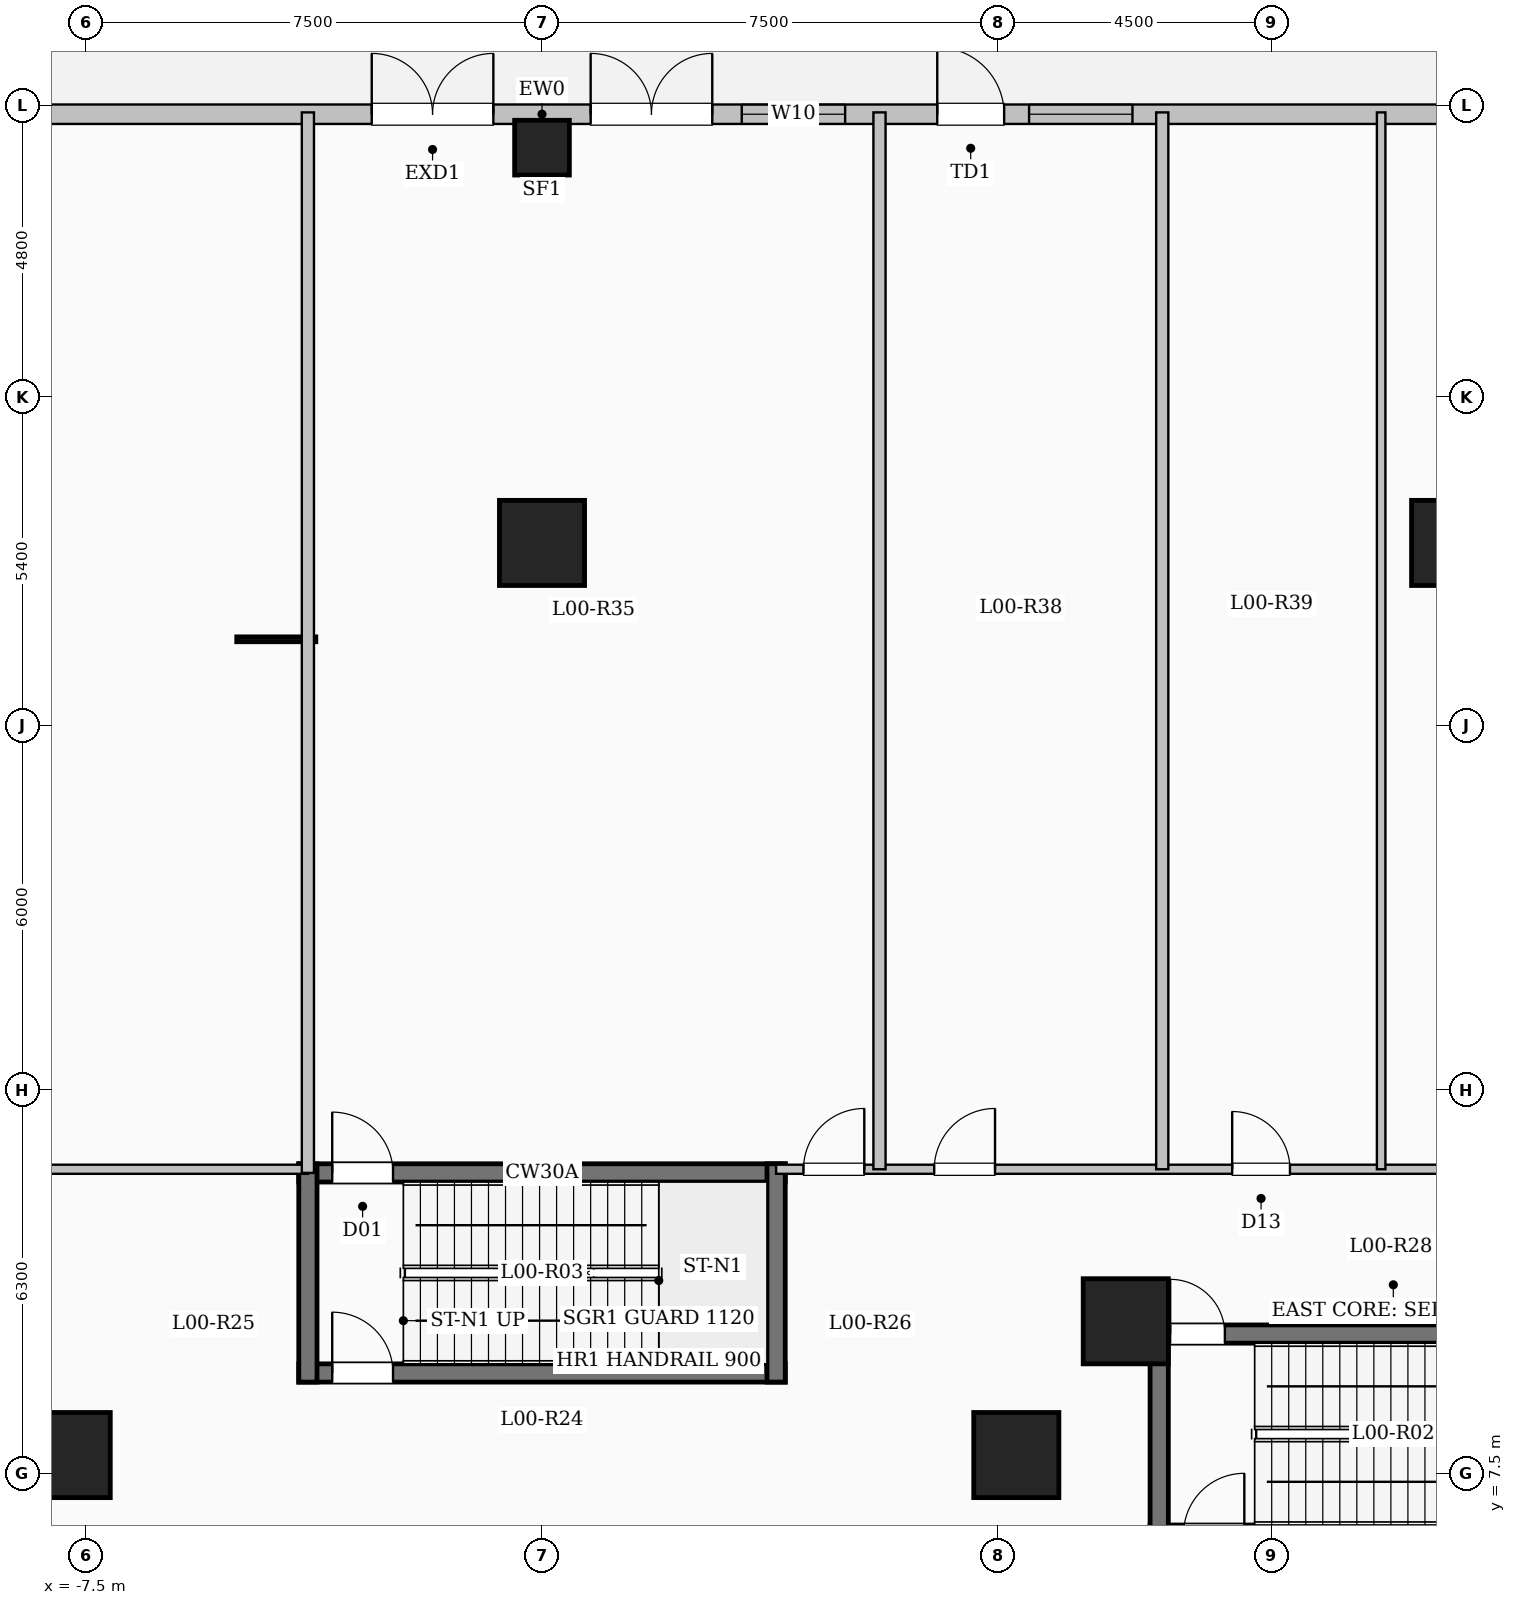
"""IFC4 building model, lengths in metres.
Left out: names, types, materials, properties, quantities, classifications, styles, units other than length and angle.
Written with IfcOpenShell. Run it as: python <this file> out.ifc"""

import sys

from ifc_helpers import new_model, si_unit, direction, frame, frame_2d, origin, origin_2d, place, context, subcontext, project, spatial, rectangle, extrude, element, fill, save


model = new_model("IFC4")
c1 = context("Model", 3, precision=1e-05, world=origin(), true_north=direction((0.0, 1.0)))
c2 = subcontext(c1, "Body", "Model", "MODEL_VIEW")
j1 = project(units=[si_unit("LENGTHUNIT", "METRE"), si_unit("PLANEANGLEUNIT", "RADIAN")], contexts=[c1])
p1 = place(None, origin())
s1 = spatial("IfcSite", under=j1, at=p1, CompositionType="ELEMENT")
p2 = place(p1, origin())
s2 = spatial("IfcBuilding", under=s1, at=p2, CompositionType="ELEMENT")
p3 = place(p2, origin())
s3 = spatial("IfcBuildingStorey", under=s2, at=p3, CompositionType="ELEMENT", Elevation=0.0)
for number, where, z_axis, x_axis in (
    (1, (-7.8, 7.8, 0.0), (0.0, 0.0, 1.0), (1.0, 0.0, 0.0)),
    (2, (7.8, 7.8, 0.0), (0.0, 0.0, 1.0), (1.0, 0.0, 0.0)),
    (3, (9.6, 10.0, 0.0), (0.0, 0.0, 1.0), (1.0, 0.0, 0.0)),
):
    element("IfcColumn", number, at=place(p3, frame(where, z_axis=z_axis, x_axis=x_axis)), inside=s3, PredefinedType="COLUMN", context=c2, shape_type="SweptSolid", body=[
        extrude(rectangle(XDim=1.4, YDim=1.4, at=origin_2d()), origin(), (0.0, 0.0, 1.0), 5.4),
    ])
p4 = place(p3, frame((0.0, 29.3, 0.0), z_axis=(0.0, 0.0, 1.0), x_axis=(1.0, 0.0, 0.0)))
e4 = element("IfcColumn", 4, at=p4, inside=s3, PredefinedType="COLUMN", context=c2, shape_type="SweptSolid", body=[
    extrude(rectangle(XDim=0.9, YDim=0.9, at=origin_2d()), origin(), (0.0, 0.0, 1.0), 5.4),
])
for number, where, z_axis, x_axis in (
    (5, (0.0, 22.8, 0.0), (0.0, 0.0, 1.0), (1.0, 0.0, 0.0)),
    (6, (15.0, 22.8, 0.0), (0.0, 0.0, 1.0), (1.0, 0.0, 0.0)),
):
    element("IfcColumn", number, at=place(p3, frame(where, z_axis=z_axis, x_axis=x_axis)), inside=s3, PredefinedType="COLUMN", context=c2, shape_type="SweptSolid", body=[
        extrude(rectangle(XDim=1.4, YDim=1.4, at=origin_2d()), origin(), (0.0, 0.0, 1.0), 5.4),
    ])
p5 = place(p3, frame((-32.85, 29.85, 0.0), z_axis=(0.0, 0.0, 1.0), x_axis=(1.0, 0.0, 0.0)))
e7 = element("IfcWall", 7, at=p5, inside=s3, PredefinedType="SOLIDWALL", context=c2, shape_type="SweptSolid", body=[
    extrude(rectangle(XDim=65.7, YDim=0.32, at=frame_2d((32.85, 0.0))), origin(), (0.0, 0.0, 1.0), 5.1),
])
p6 = place(p5, frame((30.05, 0.0, 0.0)))
e8 = element("IfcOpeningElement", 8, at=p6, cuts=e7, PredefinedType="OPENING", context=c2, shape_type="SweptSolid", body=[
    extrude(rectangle(XDim=2.0, YDim=2.4, at=frame_2d((1.0, 1.2))), frame((0.0, 0.17, 0.0), z_axis=(0.0, -1.0, 0.0), x_axis=(1.0, 0.0, 0.0)), (0.0, 0.0, 1.0), 0.34),
])
p7 = place(p5, frame((33.65, 0.0, 0.0)))
e9 = element("IfcOpeningElement", 9, at=p7, cuts=e7, PredefinedType="OPENING", context=c2, shape_type="SweptSolid", body=[
    extrude(rectangle(XDim=2.0, YDim=2.4, at=frame_2d((1.0, 1.2))), frame((0.0, 0.17, 0.0), z_axis=(0.0, -1.0, 0.0), x_axis=(1.0, 0.0, 0.0)), (0.0, 0.0, 1.0), 0.34),
])
p8 = place(p5, frame((39.35, 0.0, 0.0)))
e10 = element("IfcOpeningElement", 10, at=p8, cuts=e7, PredefinedType="OPENING", context=c2, shape_type="SweptSolid", body=[
    extrude(rectangle(XDim=1.1, YDim=2.2, at=frame_2d((0.55, 1.1))), frame((0.0, 0.17, 0.0), z_axis=(0.0, -1.0, 0.0), x_axis=(1.0, 0.0, 0.0)), (0.0, 0.0, 1.0), 0.34),
])
p9 = place(p5, frame((58.05, 0.0, 0.0)))
e11 = element("IfcOpeningElement", 11, at=p9, cuts=e7, PredefinedType="OPENING", context=c2, shape_type="SweptSolid", body=[
    extrude(rectangle(XDim=2.4, YDim=2.6, at=frame_2d((1.2, 1.3))), frame((0.0, 0.17, 0.0), z_axis=(0.0, -1.0, 0.0), x_axis=(1.0, 0.0, 0.0)), (0.0, 0.0, 1.0), 0.34),
])
p10 = place(p5, frame((7.325, 0.0, 0.9)))
e12 = element("IfcOpeningElement", 12, at=p10, cuts=e7, PredefinedType="OPENING", context=c2, shape_type="SweptSolid", body=[
    extrude(rectangle(XDim=2.1, YDim=2.0, at=frame_2d((1.05, 1.0))), frame((0.0, 0.17, 0.0), z_axis=(0.0, -1.0, 0.0), x_axis=(1.0, 0.0, 0.0)), (0.0, 0.0, 1.0), 0.34),
])
p11 = place(p5, frame((21.875, 0.0, 0.9)))
e13 = element("IfcOpeningElement", 13, at=p11, cuts=e7, PredefinedType="OPENING", context=c2, shape_type="SweptSolid", body=[
    extrude(rectangle(XDim=2.1, YDim=2.0, at=frame_2d((1.05, 1.0))), frame((0.0, 0.17, 0.0), z_axis=(0.0, -1.0, 0.0), x_axis=(1.0, 0.0, 0.0)), (0.0, 0.0, 1.0), 0.34),
])
p12 = place(p5, frame((36.135, 0.0, 0.9)))
e14 = element("IfcOpeningElement", 14, at=p12, cuts=e7, PredefinedType="OPENING", context=c2, shape_type="SweptSolid", body=[
    extrude(rectangle(XDim=1.7, YDim=1.9, at=frame_2d((0.85, 0.95))), frame((0.0, 0.17, 0.0), z_axis=(0.0, -1.0, 0.0), x_axis=(1.0, 0.0, 0.0)), (0.0, 0.0, 1.0), 0.34),
])
p13 = place(p5, frame((40.86, 0.0, 0.9)))
e15 = element("IfcOpeningElement", 15, at=p13, cuts=e7, PredefinedType="OPENING", context=c2, shape_type="SweptSolid", body=[
    extrude(rectangle(XDim=1.7, YDim=1.9, at=frame_2d((0.85, 0.95))), frame((0.0, 0.17, 0.0), z_axis=(0.0, -1.0, 0.0), x_axis=(1.0, 0.0, 0.0)), (0.0, 0.0, 1.0), 0.34),
])
p14 = place(p5, frame((52.1, 0.0, 0.9)))
e16 = element("IfcOpeningElement", 16, at=p14, cuts=e7, PredefinedType="OPENING", context=c2, shape_type="SweptSolid", body=[
    extrude(rectangle(XDim=2.1, YDim=2.0, at=frame_2d((1.05, 1.0))), frame((0.0, 0.17, 0.0), z_axis=(0.0, -1.0, 0.0), x_axis=(1.0, 0.0, 0.0)), (0.0, 0.0, 1.0), 0.34),
])
p15 = place(p5, frame((62.035, 0.0, 0.9)))
e17 = element("IfcOpeningElement", 17, at=p15, cuts=e7, PredefinedType="OPENING", context=c2, shape_type="SweptSolid", body=[
    extrude(rectangle(XDim=2.1, YDim=2.0, at=frame_2d((1.05, 1.0))), frame((0.0, 0.17, 0.0), z_axis=(0.0, -1.0, 0.0), x_axis=(1.0, 0.0, 0.0)), (0.0, 0.0, 1.0), 0.34),
])
p16 = place(p3, frame((10.0, 9.79, 0.0), z_axis=(0.0, 0.0, 1.0), x_axis=(1.0, 0.0, 0.0)))
e18 = element("IfcWall", 18, at=p16, inside=s3, PredefinedType="SHEAR", context=c2, shape_type="SweptSolid", body=[
    extrude(rectangle(XDim=8.0, YDim=0.3, at=frame_2d((4.0, 0.0))), origin(), (0.0, 0.0, 1.0), 5.4),
])
p17 = place(p16, frame((0.33, 0.0, 0.0)))
e19 = element("IfcOpeningElement", 19, at=p17, cuts=e18, PredefinedType="OPENING", context=c2, shape_type="SweptSolid", body=[
    extrude(rectangle(XDim=0.9, YDim=2.15, at=frame_2d((0.45, 1.075))), frame((0.0, 0.16, 0.0), z_axis=(0.0, -1.0, 0.0), x_axis=(1.0, 0.0, 0.0)), (0.0, 0.0, 1.0), 0.32),
])
p18 = place(p3, frame((10.0, 6.5, 0.0), z_axis=(0.0, 0.0, 1.0), x_axis=(1.0, 0.0, 0.0)))
e20 = element("IfcWall", 20, at=p18, inside=s3, PredefinedType="SHEAR", context=c2, shape_type="SweptSolid", body=[
    extrude(rectangle(XDim=8.0, YDim=0.3, at=frame_2d((4.0, 0.0))), origin(), (0.0, 0.0, 1.0), 5.4),
])
p19 = place(p18, frame((0.55, 0.0, 0.0)))
e21 = element("IfcOpeningElement", 21, at=p19, cuts=e20, PredefinedType="OPENING", context=c2, shape_type="SweptSolid", body=[
    extrude(rectangle(XDim=1.0, YDim=2.15, at=frame_2d((0.5, 1.075))), frame((0.0, 0.16, 0.0), z_axis=(0.0, -1.0, 0.0), x_axis=(1.0, 0.0, 0.0)), (0.0, 0.0, 1.0), 0.32),
])
p20 = place(p3, frame((10.15, 6.35, 0.0), z_axis=(0.0, 0.0, 1.0), x_axis=(0.0, 1.0, 0.0)))
e22 = element("IfcWall", 22, at=p20, inside=s3, PredefinedType="SHEAR", context=c2, shape_type="SweptSolid", body=[
    extrude(rectangle(XDim=3.59, YDim=0.3, at=frame_2d((1.795, 0.0))), origin(), (0.0, 0.0, 1.0), 5.4),
])
p21 = place(p3, frame((-4.0, 12.44, 0.0), z_axis=(0.0, 0.0, 1.0), x_axis=(1.0, 0.0, 0.0)))
e23 = element("IfcWall", 23, at=p21, inside=s3, PredefinedType="SHEAR", context=c2, shape_type="SweptSolid", body=[
    extrude(rectangle(XDim=8.0, YDim=0.3, at=frame_2d((4.0, 0.0))), origin(), (0.0, 0.0, 1.0), 5.4),
])
p22 = place(p21, frame((0.55, 0.0, 0.0)))
e24 = element("IfcOpeningElement", 24, at=p22, cuts=e23, PredefinedType="OPENING", context=c2, shape_type="SweptSolid", body=[
    extrude(rectangle(XDim=1.0, YDim=2.15, at=frame_2d((0.5, 1.075))), frame((0.0, 0.16, 0.0), z_axis=(0.0, -1.0, 0.0), x_axis=(1.0, 0.0, 0.0)), (0.0, 0.0, 1.0), 0.32),
])
p23 = place(p3, frame((-4.0, 9.15, 0.0), z_axis=(0.0, 0.0, 1.0), x_axis=(1.0, 0.0, 0.0)))
e25 = element("IfcWall", 25, at=p23, inside=s3, PredefinedType="SHEAR", context=c2, shape_type="SweptSolid", body=[
    extrude(rectangle(XDim=8.0, YDim=0.3, at=frame_2d((4.0, 0.0))), origin(), (0.0, 0.0, 1.0), 5.4),
])
p24 = place(p23, frame((0.55, 0.0, 0.0)))
e26 = element("IfcOpeningElement", 26, at=p24, cuts=e25, PredefinedType="OPENING", context=c2, shape_type="SweptSolid", body=[
    extrude(rectangle(XDim=1.0, YDim=2.15, at=frame_2d((0.5, 1.075))), frame((0.0, 0.16, 0.0), z_axis=(0.0, -1.0, 0.0), x_axis=(1.0, 0.0, 0.0)), (0.0, 0.0, 1.0), 0.32),
])
for number, where, z_axis, x_axis in (
    (27, (-3.85, 9.0, 0.0), (0.0, 0.0, 1.0), (0.0, 1.0, 0.0)),
    (28, (3.85, 9.0, 0.0), (0.0, 0.0, 1.0), (0.0, 1.0, 0.0)),
):
    element("IfcWall", number, at=place(p3, frame(where, z_axis=z_axis, x_axis=x_axis)), inside=s3, PredefinedType="SHEAR", context=c2, shape_type="SweptSolid", body=[
        extrude(rectangle(XDim=3.59, YDim=0.3, at=frame_2d((1.795, 0.0))), origin(), (0.0, 0.0, 1.0), 5.4),
    ])
p25 = place(p3, frame((-32.88, 12.5, 0.0), z_axis=(0.0, 0.0, 1.0), x_axis=(1.0, 0.0, 0.0)))
e29 = element("IfcWall", 29, at=p25, inside=s3, PredefinedType="PARTITIONING", context=c2, shape_type="SweptSolid", body=[
    extrude(rectangle(XDim=29.03, YDim=0.15, at=frame_2d((14.515, 0.0))), origin(), (0.0, 0.0, 1.0), 5.1),
])
p26 = place(p25, frame((2.9, 0.0, 0.0)))
e30 = element("IfcOpeningElement", 30, at=p26, cuts=e29, PredefinedType="OPENING", context=c2, shape_type="SweptSolid", body=[
    extrude(rectangle(XDim=1.4, YDim=2.2, at=frame_2d((0.7, 1.1))), frame((0.0, 0.085, 0.0), z_axis=(0.0, -1.0, 0.0), x_axis=(1.0, 0.0, 0.0)), (0.0, 0.0, 1.0), 0.17),
])
p27 = place(p25, frame((20.88, 0.0, 0.0)))
e31 = element("IfcOpeningElement", 31, at=p27, cuts=e29, PredefinedType="OPENING", context=c2, shape_type="SweptSolid", body=[
    extrude(rectangle(XDim=1.2, YDim=2.15, at=frame_2d((0.6, 1.075))), frame((0.0, 0.085, 0.0), z_axis=(0.0, -1.0, 0.0), x_axis=(1.0, 0.0, 0.0)), (0.0, 0.0, 1.0), 0.17),
])
p28 = place(p3, frame((3.85, 12.5, 0.0), z_axis=(0.0, 0.0, 1.0), x_axis=(1.0, 0.0, 0.0)))
e32 = element("IfcWall", 32, at=p28, inside=s3, PredefinedType="PARTITIONING", context=c2, shape_type="SweptSolid", body=[
    extrude(rectangle(XDim=29.03, YDim=0.15, at=frame_2d((14.515, 0.0))), origin(), (0.0, 0.0, 1.0), 5.1),
])
p29 = place(p28, frame((0.45, 0.0, 0.0)))
e33 = element("IfcOpeningElement", 33, at=p29, cuts=e32, PredefinedType="OPENING", context=c2, shape_type="SweptSolid", body=[
    extrude(rectangle(XDim=1.0, YDim=2.15, at=frame_2d((0.5, 1.075))), frame((0.0, 0.085, 0.0), z_axis=(0.0, -1.0, 0.0), x_axis=(1.0, 0.0, 0.0)), (0.0, 0.0, 1.0), 0.17),
])
p30 = place(p28, frame((2.6, 0.0, 0.0)))
e34 = element("IfcOpeningElement", 34, at=p30, cuts=e32, PredefinedType="OPENING", context=c2, shape_type="SweptSolid", body=[
    extrude(rectangle(XDim=1.0, YDim=2.15, at=frame_2d((0.5, 1.075))), frame((0.0, 0.085, 0.0), z_axis=(0.0, -1.0, 0.0), x_axis=(1.0, 0.0, 0.0)), (0.0, 0.0, 1.0), 0.17),
])
p31 = place(p28, frame((7.5, 0.0, 0.0)))
e35 = element("IfcOpeningElement", 35, at=p31, cuts=e32, PredefinedType="OPENING", context=c2, shape_type="SweptSolid", body=[
    extrude(rectangle(XDim=0.95, YDim=2.15, at=frame_2d((0.475, 1.075))), frame((0.0, 0.085, 0.0), z_axis=(0.0, -1.0, 0.0), x_axis=(1.0, 0.0, 0.0)), (0.0, 0.0, 1.0), 0.17),
])
p32 = place(p28, frame((11.1, 0.0, 0.0)))
e36 = element("IfcOpeningElement", 36, at=p32, cuts=e32, PredefinedType="OPENING", context=c2, shape_type="SweptSolid", body=[
    extrude(rectangle(XDim=0.95, YDim=2.15, at=frame_2d((0.475, 1.075))), frame((0.0, 0.085, 0.0), z_axis=(0.0, -1.0, 0.0), x_axis=(1.0, 0.0, 0.0)), (0.0, 0.0, 1.0), 0.17),
])
p33 = place(p28, frame((15.7, 0.0, 0.0)))
e37 = element("IfcOpeningElement", 37, at=p33, cuts=e32, PredefinedType="OPENING", context=c2, shape_type="SweptSolid", body=[
    extrude(rectangle(XDim=1.2, YDim=2.15, at=frame_2d((0.6, 1.075))), frame((0.0, 0.085, 0.0), z_axis=(0.0, -1.0, 0.0), x_axis=(1.0, 0.0, 0.0)), (0.0, 0.0, 1.0), 0.17),
])
p34 = place(p28, frame((21.1, 0.0, 0.0)))
e38 = element("IfcOpeningElement", 38, at=p34, cuts=e32, PredefinedType="OPENING", context=c2, shape_type="SweptSolid", body=[
    extrude(rectangle(XDim=1.4, YDim=2.2, at=frame_2d((0.7, 1.1))), frame((0.0, 0.085, 0.0), z_axis=(0.0, -1.0, 0.0), x_axis=(1.0, 0.0, 0.0)), (0.0, 0.0, 1.0), 0.17),
])
p35 = place(p3, frame((-3.85, 12.44, 0.0), z_axis=(0.0, 0.0, 1.0), x_axis=(0.0, 1.0, 0.0)))
e39 = element("IfcWall", 39, at=p35, inside=s3, PredefinedType="SOLIDWALL", context=c2, shape_type="SweptSolid", body=[
    extrude(rectangle(XDim=17.44, YDim=0.2, at=frame_2d((8.72, 0.0))), origin(), (0.0, 0.0, 1.0), 5.1),
])
p36 = place(p3, frame((5.55, 12.5, 0.0), z_axis=(0.0, 0.0, 1.0), x_axis=(0.0, 1.0, 0.0)))
e40 = element("IfcWall", 40, at=p36, inside=s3, PredefinedType="SOLIDWALL", context=c2, shape_type="SweptSolid", body=[
    extrude(rectangle(XDim=17.38, YDim=0.2, at=frame_2d((8.69, 0.0))), origin(), (0.0, 0.0, 1.0), 4.285),
])
p37 = place(p3, frame((10.2, 12.5, 0.0), z_axis=(0.0, 0.0, 1.0), x_axis=(0.0, 1.0, 0.0)))
e41 = element("IfcWall", 41, at=p37, inside=s3, PredefinedType="SOLIDWALL", context=c2, shape_type="SweptSolid", body=[
    extrude(rectangle(XDim=17.38, YDim=0.2, at=frame_2d((8.69, 0.0))), origin(), (0.0, 0.0, 1.0), 5.1),
])
p38 = place(p3, frame((13.8, 12.5, 0.0), z_axis=(0.0, 0.0, 1.0), x_axis=(0.0, 1.0, 0.0)))
e42 = element("IfcWall", 42, at=p38, inside=s3, PredefinedType="PARTITIONING", context=c2, shape_type="SweptSolid", body=[
    extrude(rectangle(XDim=17.38, YDim=0.14, at=frame_2d((8.69, 0.0))), origin(), (0.0, 0.0, 1.0), 5.1),
])
p39 = place(p6, origin())
e43 = element("IfcDoor", 43, at=p39, inside=s3, OperationType="DOUBLE_DOOR_SINGLE_SWING", PredefinedType="DOOR", context=c2, shape_type="SweptSolid", body=[
    extrude(rectangle(XDim=2.0, YDim=2.4, at=frame_2d((1.0, 1.2))), frame((0.0, 0.025, 0.0), z_axis=(0.0, -1.0, 0.0), x_axis=(1.0, 0.0, 0.0)), (0.0, 0.0, 1.0), 0.05),
])
fill(e8, e43)
p40 = place(p7, origin())
e44 = element("IfcDoor", 44, at=p40, inside=s3, OperationType="DOUBLE_DOOR_SINGLE_SWING", PredefinedType="DOOR", context=c2, shape_type="SweptSolid", body=[
    extrude(rectangle(XDim=2.0, YDim=2.4, at=frame_2d((1.0, 1.2))), frame((0.0, 0.025, 0.0), z_axis=(0.0, -1.0, 0.0), x_axis=(1.0, 0.0, 0.0)), (0.0, 0.0, 1.0), 0.05),
])
fill(e9, e44)
p41 = place(p8, origin())
e45 = element("IfcDoor", 45, at=p41, inside=s3, OperationType="SINGLE_SWING_LEFT", PredefinedType="DOOR", context=c2, shape_type="SweptSolid", body=[
    extrude(rectangle(XDim=1.1, YDim=2.2, at=frame_2d((0.55, 1.1))), frame((0.0, 0.025, 0.0), z_axis=(0.0, -1.0, 0.0), x_axis=(1.0, 0.0, 0.0)), (0.0, 0.0, 1.0), 0.05),
])
fill(e10, e45)
p42 = place(p12, origin())
e46 = element("IfcWindow", 46, at=p42, inside=s3, PartitioningType="SINGLE_PANEL", PredefinedType="WINDOW", context=c2, shape_type="SweptSolid", body=[
    extrude(rectangle(XDim=1.7, YDim=1.9, at=frame_2d((0.85, 0.95))), frame((0.0, 0.03, 0.0), z_axis=(0.0, -1.0, 0.0), x_axis=(1.0, 0.0, 0.0)), (0.0, 0.0, 1.0), 0.06),
])
fill(e14, e46)
p43 = place(p13, origin())
e47 = element("IfcWindow", 47, at=p43, inside=s3, PartitioningType="SINGLE_PANEL", PredefinedType="WINDOW", context=c2, shape_type="SweptSolid", body=[
    extrude(rectangle(XDim=1.7, YDim=1.9, at=frame_2d((0.85, 0.95))), frame((0.0, 0.03, 0.0), z_axis=(0.0, -1.0, 0.0), x_axis=(1.0, 0.0, 0.0)), (0.0, 0.0, 1.0), 0.06),
])
fill(e15, e47)
p44 = place(p17, origin())
e48 = element("IfcDoor", 48, at=p44, inside=s3, OperationType="SINGLE_SWING_LEFT", PredefinedType="DOOR", context=c2, shape_type="SweptSolid", body=[
    extrude(rectangle(XDim=0.9, YDim=2.15, at=frame_2d((0.45, 1.075))), frame((0.0, 0.025, 0.0), z_axis=(0.0, -1.0, 0.0), x_axis=(1.0, 0.0, 0.0)), (0.0, 0.0, 1.0), 0.05),
])
fill(e19, e48)
p45 = place(p22, origin())
e49 = element("IfcDoor", 49, at=p45, inside=s3, OperationType="SINGLE_SWING_LEFT", PredefinedType="DOOR", context=c2, shape_type="SweptSolid", body=[
    extrude(rectangle(XDim=1.0, YDim=2.15, at=frame_2d((0.5, 1.075))), frame((0.0, 0.025, 0.0), z_axis=(0.0, -1.0, 0.0), x_axis=(1.0, 0.0, 0.0)), (0.0, 0.0, 1.0), 0.05),
])
fill(e24, e49)
p46 = place(p24, origin())
e50 = element("IfcDoor", 50, at=p46, inside=s3, OperationType="SINGLE_SWING_LEFT", PredefinedType="DOOR", context=c2, shape_type="SweptSolid", body=[
    extrude(rectangle(XDim=1.0, YDim=2.15, at=frame_2d((0.5, 1.075))), frame((0.0, 0.025, 0.0), z_axis=(0.0, -1.0, 0.0), x_axis=(1.0, 0.0, 0.0)), (0.0, 0.0, 1.0), 0.05),
])
fill(e26, e50)
p47 = place(p29, origin())
e51 = element("IfcDoor", 51, at=p47, inside=s3, OperationType="SINGLE_SWING_RIGHT", PredefinedType="DOOR", context=c2, shape_type="SweptSolid", body=[
    extrude(rectangle(XDim=1.0, YDim=2.15, at=frame_2d((0.5, 1.075))), frame((0.0, 0.025, 0.0), z_axis=(0.0, -1.0, 0.0), x_axis=(1.0, 0.0, 0.0)), (0.0, 0.0, 1.0), 0.05),
])
fill(e33, e51)
p48 = place(p30, origin())
e52 = element("IfcDoor", 52, at=p48, inside=s3, OperationType="SINGLE_SWING_RIGHT", PredefinedType="DOOR", context=c2, shape_type="SweptSolid", body=[
    extrude(rectangle(XDim=1.0, YDim=2.15, at=frame_2d((0.5, 1.075))), frame((0.0, 0.025, 0.0), z_axis=(0.0, -1.0, 0.0), x_axis=(1.0, 0.0, 0.0)), (0.0, 0.0, 1.0), 0.05),
])
fill(e34, e52)
p49 = place(p31, origin())
e53 = element("IfcDoor", 53, at=p49, inside=s3, OperationType="SINGLE_SWING_LEFT", PredefinedType="DOOR", context=c2, shape_type="SweptSolid", body=[
    extrude(rectangle(XDim=0.95, YDim=2.15, at=frame_2d((0.475, 1.075))), frame((0.0, 0.025, 0.0), z_axis=(0.0, -1.0, 0.0), x_axis=(1.0, 0.0, 0.0)), (0.0, 0.0, 1.0), 0.05),
])
fill(e35, e53)
save(model, sys.argv[1])
